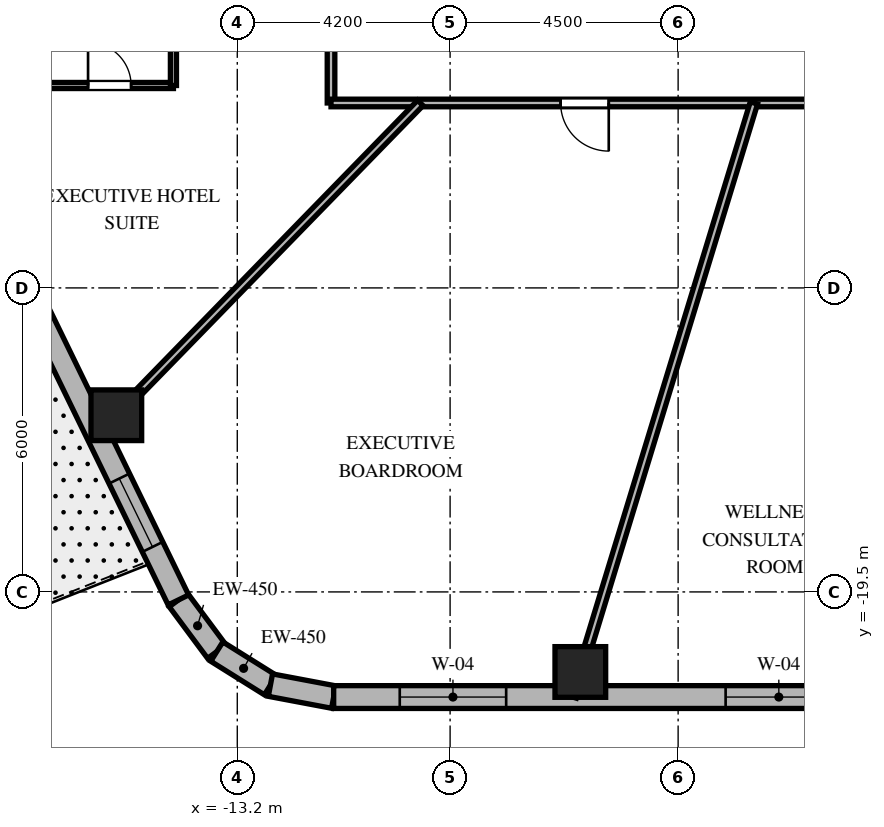
"""IFC4 building model, lengths in metres.
Left out: names, types, materials, properties, quantities, classifications, styles, units other than length and angle.
Written with IfcOpenShell. Run it as: python <this file> out.ifc"""

import sys

from ifc_helpers import new_model, si_unit, direction, frame, frame_2d, origin, origin_2d, place, context, subcontext, project, spatial, rectangle, extrude, element, fill, save


model = new_model("IFC4")
c1 = context("Model", 3, precision=1e-05, world=origin(), true_north=direction((0.0, 1.0)))
c2 = subcontext(c1, "Body", "Model", "MODEL_VIEW")
j1 = project(units=[si_unit("LENGTHUNIT", "METRE"), si_unit("PLANEANGLEUNIT", "RADIAN")], contexts=[c1])
p1 = place(None, origin())
s1 = spatial("IfcSite", under=j1, at=p1, CompositionType="ELEMENT")
p2 = place(p1, origin())
s2 = spatial("IfcBuilding", under=s1, at=p2, CompositionType="ELEMENT")
p3 = place(p2, frame((0.0, 0.0, 233.1)))
s3 = spatial("IfcBuildingStorey", under=s2, at=p3, CompositionType="ELEMENT", Elevation=233.1)
for number, where, z_axis, x_axis in (
    (1, (-6.43, -21.08, 0.0), (0.0, 0.0, 1.0), (1.0, 0.0, 0.0)),
    (2, (-15.587, -16.013, 0.0), (0.0, 0.0, 1.0), (1.0, 0.0, 0.0)),
):
    element("IfcColumn", number, at=place(p3, frame(where, z_axis=z_axis, x_axis=x_axis)), inside=s3, PredefinedType="COLUMN", context=c2, shape_type="SweptSolid", body=[
        extrude(rectangle(XDim=1.0, YDim=1.0, at=origin_2d()), origin(), (0.0, 0.0, 1.0), 3.8),
    ])
p4 = place(p3, frame((-14.362, -19.658, 0.0), z_axis=(0.0, 0.0, 1.0), x_axis=(0.596642462792, -0.80250717853, 0.0)))
e3 = element("IfcWall", 3, at=p4, inside=s3, PredefinedType="SOLIDWALL", context=c2, shape_type="SweptSolid", body=[
    extrude(rectangle(XDim=1.27, YDim=0.45, at=frame_2d((0.635, 0.0))), origin(), (0.0, 0.0, 1.0), 3.5),
])
p5 = place(p3, frame((-13.604, -20.678, 0.0), z_axis=(0.0, 0.0, 1.0), x_axis=(0.847910404124, -0.53013955387, 0.0)))
e4 = element("IfcWall", 4, at=p5, inside=s3, PredefinedType="SOLIDWALL", context=c2, shape_type="SweptSolid", body=[
    extrude(rectangle(XDim=1.249, YDim=0.45, at=frame_2d((0.624, 0.0))), origin(), (0.0, 0.0, 1.0), 3.5),
])
p6 = place(p3, frame((-12.546, -21.34, 0.0), z_axis=(0.0, 0.0, 1.0), x_axis=(0.982686750835, -0.18527479519, 0.0)))
e5 = element("IfcWall", 5, at=p6, inside=s3, PredefinedType="SOLIDWALL", context=c2, shape_type="SweptSolid", body=[
    extrude(rectangle(XDim=1.27, YDim=0.45, at=frame_2d((0.635, 0.0))), origin(), (0.0, 0.0, 1.0), 3.5),
])
p7 = place(p3, frame((-11.298, -21.575, 0.0), z_axis=(0.0, 0.0, 1.0), x_axis=(1.0, 0.0, 0.0)))
e6 = element("IfcWall", 6, at=p7, inside=s3, PredefinedType="SOLIDWALL", context=c2, shape_type="SweptSolid", body=[
    extrude(rectangle(XDim=24.399, YDim=0.45, at=frame_2d((12.2, 0.0))), origin(), (0.0, 0.0, 1.0), 3.5),
])
p8 = place(p7, frame((1.304, 0.0, 0.8)))
e7 = element("IfcOpeningElement", 7, at=p8, cuts=e6, PredefinedType="OPENING", context=c2, shape_type="SweptSolid", body=[
    extrude(rectangle(XDim=2.1, YDim=1.85, at=frame_2d((1.05, 0.925))), frame((0.0, 0.235, 0.0), z_axis=(0.0, -1.0, 0.0), x_axis=(1.0, 0.0, 0.0)), (0.0, 0.0, 1.0), 0.47),
])
p9 = place(p7, frame((7.735, 0.0, 0.8)))
e8 = element("IfcOpeningElement", 8, at=p9, cuts=e6, PredefinedType="OPENING", context=c2, shape_type="SweptSolid", body=[
    extrude(rectangle(XDim=2.1, YDim=1.85, at=frame_2d((1.05, 0.925))), frame((0.0, 0.235, 0.0), z_axis=(0.0, -1.0, 0.0), x_axis=(1.0, 0.0, 0.0)), (0.0, 0.0, 1.0), 0.47),
])
p10 = place(p7, frame((14.488, 0.0, 0.8)))
e9 = element("IfcOpeningElement", 9, at=p10, cuts=e6, PredefinedType="OPENING", context=c2, shape_type="SweptSolid", body=[
    extrude(rectangle(XDim=2.1, YDim=1.85, at=frame_2d((1.05, 0.925))), frame((0.0, 0.235, 0.0), z_axis=(0.0, -1.0, 0.0), x_axis=(1.0, 0.0, 0.0)), (0.0, 0.0, 1.0), 0.47),
])
p11 = place(p7, frame((20.996, 0.0, 0.8)))
e10 = element("IfcOpeningElement", 10, at=p11, cuts=e6, PredefinedType="OPENING", context=c2, shape_type="SweptSolid", body=[
    extrude(rectangle(XDim=2.1, YDim=1.85, at=frame_2d((1.05, 0.925))), frame((0.0, 0.235, 0.0), z_axis=(0.0, -1.0, 0.0), x_axis=(1.0, 0.0, 0.0)), (0.0, 0.0, 1.0), 0.47),
])
p12 = place(p3, frame((-22.74, -2.452, 0.0), z_axis=(0.0, 0.0, 1.0), x_axis=(0.437753424814, -0.899095066755, 0.0)))
e11 = element("IfcWall", 11, at=p12, inside=s3, PredefinedType="SOLIDWALL", context=c2, shape_type="SweptSolid", body=[
    extrude(rectangle(XDim=19.137, YDim=0.45, at=frame_2d((9.569, 0.0))), origin(), (0.0, 0.0, 1.0), 3.5),
])
p13 = place(p12, frame((4.763, 0.0, 0.0)))
e12 = element("IfcOpeningElement", 12, at=p13, cuts=e11, PredefinedType="OPENING", context=c2, shape_type="SweptSolid", body=[
    extrude(rectangle(XDim=0.95, YDim=2.15, at=frame_2d((0.475, 1.075))), frame((0.0, 0.235, 0.0), z_axis=(0.0, -1.0, 0.0), x_axis=(1.0, 0.0, 0.0)), (0.0, 0.0, 1.0), 0.47),
])
p14 = place(p12, frame((1.216, 0.0, 0.8)))
e13 = element("IfcOpeningElement", 13, at=p14, cuts=e11, PredefinedType="OPENING", context=c2, shape_type="SweptSolid", body=[
    extrude(rectangle(XDim=1.5, YDim=1.8, at=frame_2d((0.75, 0.9))), frame((0.0, 0.235, 0.0), z_axis=(0.0, -1.0, 0.0), x_axis=(1.0, 0.0, 0.0)), (0.0, 0.0, 1.0), 0.47),
])
p15 = place(p12, frame((8.87, 0.0, 0.8)))
e14 = element("IfcOpeningElement", 14, at=p15, cuts=e11, PredefinedType="OPENING", context=c2, shape_type="SweptSolid", body=[
    extrude(rectangle(XDim=1.5, YDim=1.8, at=frame_2d((0.75, 0.9))), frame((0.0, 0.235, 0.0), z_axis=(0.0, -1.0, 0.0), x_axis=(1.0, 0.0, 0.0)), (0.0, 0.0, 1.0), 0.47),
])
p16 = place(p12, frame((16.473, 0.0, 0.8)))
e15 = element("IfcOpeningElement", 15, at=p16, cuts=e11, PredefinedType="OPENING", context=c2, shape_type="SweptSolid", body=[
    extrude(rectangle(XDim=1.5, YDim=1.8, at=frame_2d((0.75, 0.9))), frame((0.0, 0.235, 0.0), z_axis=(0.0, -1.0, 0.0), x_axis=(1.0, 0.0, 0.0)), (0.0, 0.0, 1.0), 0.47),
])
p17 = place(p3, frame((-11.35, -9.85, 0.0), z_axis=(0.0, 0.0, 1.0), x_axis=(0.0, 1.0, 0.0)))
e16 = element("IfcWall", 16, at=p17, inside=s3, PredefinedType="PARTITIONING", context=c2, shape_type="SweptSolid", body=[
    extrude(rectangle(XDim=12.4, YDim=0.15, at=frame_2d((6.2, 0.0))), origin(), (0.0, 0.0, 1.0), 2.99),
])
p18 = place(p17, frame((8.835, 0.0, 0.0)))
e17 = element("IfcOpeningElement", 17, at=p18, cuts=e16, PredefinedType="OPENING", context=c2, shape_type="SweptSolid", body=[
    extrude(rectangle(XDim=0.95, YDim=2.03, at=frame_2d((0.475, 1.015))), frame((0.0, 0.085, 0.0), z_axis=(0.0, -1.0, 0.0), x_axis=(1.0, 0.0, 0.0)), (0.0, 0.0, 1.0), 0.17),
])
p19 = place(p17, frame((3.01, 0.0, 0.0)))
e18 = element("IfcOpeningElement", 18, at=p19, cuts=e16, PredefinedType="OPENING", context=c2, shape_type="SweptSolid", body=[
    extrude(rectangle(XDim=0.95, YDim=2.03, at=frame_2d((0.475, 1.015))), frame((0.0, 0.085, 0.0), z_axis=(0.0, -1.0, 0.0), x_axis=(1.0, 0.0, 0.0)), (0.0, 0.0, 1.0), 0.17),
])
p20 = place(p3, frame((-0.92, -9.85, 0.0), z_axis=(0.0, 0.0, 1.0), x_axis=(-1.0, 0.0, 0.0)))
e19 = element("IfcWall", 19, at=p20, inside=s3, PredefinedType="PARTITIONING", context=c2, shape_type="SweptSolid", body=[
    extrude(rectangle(XDim=10.43, YDim=0.15, at=frame_2d((5.215, 0.0))), origin(), (0.0, 0.0, 1.0), 2.99),
])
p21 = place(p20, frame((4.949, 0.0, 0.0)))
e20 = element("IfcOpeningElement", 20, at=p21, cuts=e19, PredefinedType="OPENING", context=c2, shape_type="SweptSolid", body=[
    extrude(rectangle(XDim=0.95, YDim=2.03, at=frame_2d((0.475, 1.015))), frame((0.0, 0.085, 0.0), z_axis=(0.0, -1.0, 0.0), x_axis=(1.0, 0.0, 0.0)), (0.0, 0.0, 1.0), 0.17),
])
p22 = place(p3, frame((-9.588, -9.85, 0.0), z_axis=(0.0, 0.0, 1.0), x_axis=(-0.697519469595, -0.716565830567, 0.0)))
e21 = element("IfcWall", 21, at=p22, inside=s3, PredefinedType="PARTITIONING", context=c2, shape_type="SweptSolid", body=[
    extrude(rectangle(XDim=9.126, YDim=0.15, at=frame_2d((4.563, 0.0))), origin(), (0.0, 0.0, 1.0), 2.74),
])
p23 = place(p3, frame((-3.004, -9.85, 0.0), z_axis=(0.0, 0.0, 1.0), x_axis=(-0.291775760688, -0.956486751333, 0.0)))
e22 = element("IfcWall", 22, at=p23, inside=s3, PredefinedType="PARTITIONING", context=c2, shape_type="SweptSolid", body=[
    extrude(rectangle(XDim=12.258, YDim=0.15, at=frame_2d((6.129, 0.0))), origin(), (0.0, 0.0, 1.0), 2.74),
])
p24 = place(p3, frame((-16.98, -9.505, 0.0), z_axis=(0.0, 0.0, 1.0), x_axis=(1.0, 0.0, 0.0)))
e23 = element("IfcWall", 23, at=p24, inside=s3, PredefinedType="PARTITIONING", context=c2, shape_type="SweptSolid", body=[
    extrude(rectangle(XDim=2.52, YDim=0.12, at=frame_2d((1.26, 0.0))), origin(), (0.0, 0.0, 1.0), 3.026),
])
p25 = place(p24, frame((0.835, 0.0, 0.0)))
e24 = element("IfcOpeningElement", 24, at=p25, cuts=e23, PredefinedType="OPENING", context=c2, shape_type="SweptSolid", body=[
    extrude(rectangle(XDim=0.85, YDim=2.03, at=frame_2d((0.425, 1.015))), frame((0.0, 0.07, 0.0), z_axis=(0.0, -1.0, 0.0), x_axis=(1.0, 0.0, 0.0)), (0.0, 0.0, 1.0), 0.14),
])
p26 = place(p3, frame((-14.46, -9.505, 0.0), z_axis=(0.0, 0.0, 1.0), x_axis=(0.0, 1.0, 0.0)))
e25 = element("IfcWall", 25, at=p26, inside=s3, PredefinedType="PARTITIONING", context=c2, shape_type="SweptSolid", body=[
    extrude(rectangle(XDim=2.68, YDim=0.12, at=frame_2d((1.34, 0.0))), origin(), (0.0, 0.0, 1.0), 3.5),
])
p27 = place(p8, origin())
e26 = element("IfcWindow", 26, at=p27, inside=s3, PartitioningType="SINGLE_PANEL", PredefinedType="WINDOW", context=c2, shape_type="SweptSolid", body=[
    extrude(rectangle(XDim=2.1, YDim=1.85, at=frame_2d((1.05, 0.925))), frame((0.0, 0.03, 0.0), z_axis=(0.0, -1.0, 0.0), x_axis=(1.0, 0.0, 0.0)), (0.0, 0.0, 1.0), 0.06),
])
fill(e7, e26)
p28 = place(p9, origin())
e27 = element("IfcWindow", 27, at=p28, inside=s3, PartitioningType="SINGLE_PANEL", PredefinedType="WINDOW", context=c2, shape_type="SweptSolid", body=[
    extrude(rectangle(XDim=2.1, YDim=1.85, at=frame_2d((1.05, 0.925))), frame((0.0, 0.03, 0.0), z_axis=(0.0, -1.0, 0.0), x_axis=(1.0, 0.0, 0.0)), (0.0, 0.0, 1.0), 0.06),
])
fill(e8, e27)
p29 = place(p16, origin())
e28 = element("IfcWindow", 28, at=p29, inside=s3, PartitioningType="SINGLE_PANEL", PredefinedType="WINDOW", context=c2, shape_type="SweptSolid", body=[
    extrude(rectangle(XDim=1.5, YDim=1.8, at=frame_2d((0.75, 0.9))), frame((0.0, 0.03, 0.0), z_axis=(0.0, -1.0, 0.0), x_axis=(1.0, 0.0, 0.0)), (0.0, 0.0, 1.0), 0.06),
])
fill(e15, e28)
p30 = place(p25, origin())
e29 = element("IfcDoor", 29, at=p30, inside=s3, OperationType="SINGLE_SWING_LEFT", PredefinedType="DOOR", context=c2, shape_type="SweptSolid", body=[
    extrude(rectangle(XDim=0.85, YDim=2.03, at=frame_2d((0.425, 1.015))), frame((0.0, 0.025, 0.0), z_axis=(0.0, -1.0, 0.0), x_axis=(1.0, 0.0, 0.0)), (0.0, 0.0, 1.0), 0.05),
])
fill(e24, e29)
p31 = place(p21, origin())
e30 = element("IfcDoor", 30, at=p31, inside=s3, OperationType="SINGLE_SWING_LEFT", PredefinedType="DOOR", context=c2, shape_type="SweptSolid", body=[
    extrude(rectangle(XDim=0.95, YDim=2.03, at=frame_2d((0.475, 1.015))), frame((0.0, 0.025, 0.0), z_axis=(0.0, -1.0, 0.0), x_axis=(1.0, 0.0, 0.0)), (0.0, 0.0, 1.0), 0.05),
])
fill(e20, e30)
save(model, sys.argv[1])
